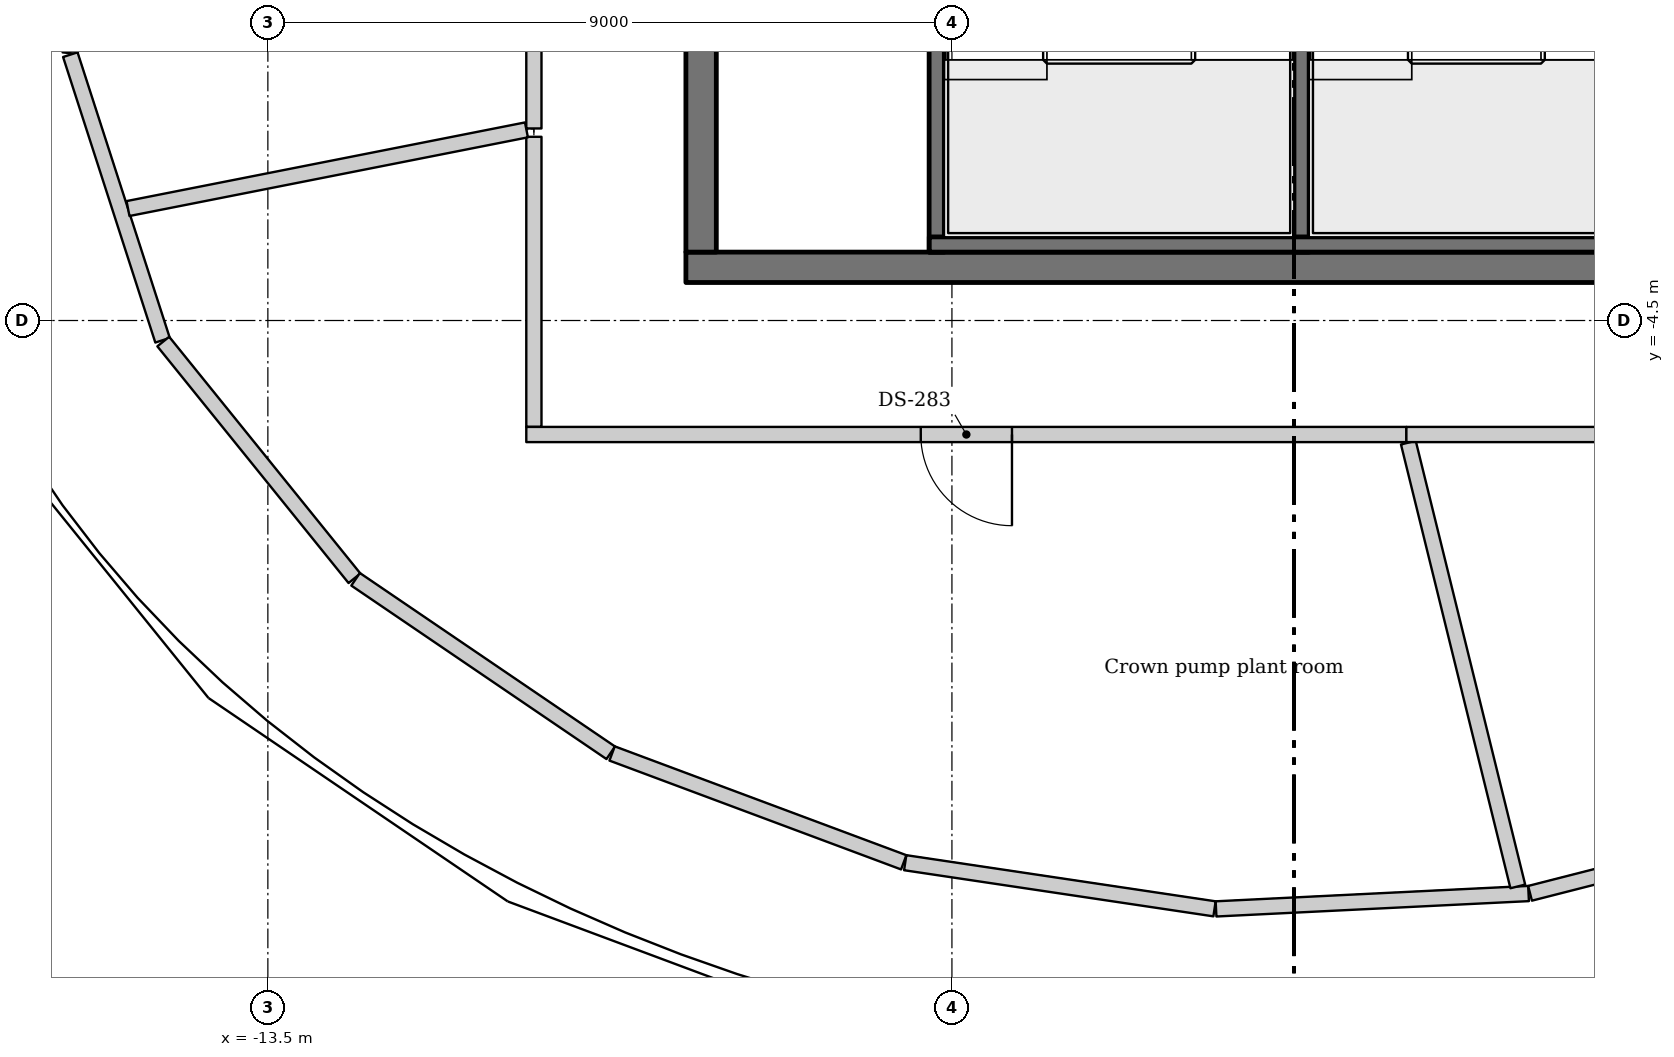
"""IFC4 building model, lengths in metres.
Left out: names, types, materials, properties, quantities, classifications, styles, units other than length and angle.
Written with IfcOpenShell. Run it as: python <this file> out.ifc"""

import sys

from ifc_helpers import new_model, si_unit, direction, frame, frame_2d, origin, place, context, subcontext, project, spatial, rectangle, extrude, source, transform, mapped, element, fill, save


model = new_model("IFC4")
c1 = context("Model", 3, precision=1e-05, world=origin(), true_north=direction((0.0, 1.0)))
c2 = subcontext(c1, "Body", "Model", "MODEL_VIEW")
j1 = project(units=[si_unit("LENGTHUNIT", "METRE"), si_unit("PLANEANGLEUNIT", "RADIAN")], contexts=[c1])
p1 = place(None, origin())
s1 = spatial("IfcSite", under=j1, at=p1, CompositionType="ELEMENT")
p2 = place(p1, origin())
s2 = spatial("IfcBuilding", under=s1, at=p2, CompositionType="ELEMENT")
p3 = place(p2, frame((0.0, 0.0, 356.5)))
s3 = spatial("IfcBuildingStorey", under=s2, at=p3, CompositionType="ELEMENT", Elevation=356.5)
m1 = source(origin(), c2, "Body", "SweptSolid", [
    extrude(rectangle(XDim=16.0, YDim=0.4, at=frame_2d((8.0, 0.0))), origin(), (0.0, 0.0, 1.0), 4.25),
])
p4 = place(p3, frame((-8.0, -3.8, 0.0), z_axis=(0.0, 0.0, 1.0), x_axis=(1.0, 0.0, 0.0)))
e1 = element("IfcWall", 1, at=p4, inside=s3, PredefinedType="SHEAR", context=c2, shape_type="MappedRepresentation", body=[
    mapped(m1, transform((0.0, 0.0, 0.0))),
])
m2 = source(origin(), c2, "Body", "SweptSolid", [
    extrude(rectangle(XDim=7.2, YDim=0.4, at=frame_2d((3.6, 0.0))), origin(), (0.0, 0.0, 1.0), 4.25),
])
p5 = place(p3, frame((-7.8, -3.6, 0.0), z_axis=(0.0, 0.0, 1.0), x_axis=(0.0, 1.0, 0.0)))
e2 = element("IfcWall", 2, at=p5, inside=s3, PredefinedType="SHEAR", context=c2, shape_type="MappedRepresentation", body=[
    mapped(m2, transform((0.0, 0.0, 0.0))),
])
m3 = source(origin(), c2, "Body", "SweptSolid", [
    extrude(rectangle(XDim=1.5, YDim=2.1, at=frame_2d((0.75, 1.05))), frame((0.0, 0.21, 0.0), z_axis=(0.0, -1.0, 0.0), x_axis=(1.0, 0.0, 0.0)), (0.0, 0.0, 1.0), 0.42),
])
p6 = place(p5, frame((4.8, 0.0, 0.0)))
e3 = element("IfcOpeningElement", 3, at=p6, cuts=e2, PredefinedType="OPENING", context=c2, shape_type="MappedRepresentation", body=[
    mapped(m3, transform((0.0, 0.0, 0.0))),
])
m4 = source(origin(), c2, "Body", "SweptSolid", [
    extrude(rectangle(XDim=3.933, YDim=0.2, at=frame_2d((1.966, 0.0))), origin(), (0.0, 0.0, 1.0), 4.25),
])
p7 = place(p3, frame((-16.101, -0.983, 0.0), z_axis=(0.0, 0.0, 1.0), x_axis=(0.10577691274, 0.994389885674, 0.0)))
e4 = element("IfcWall", 4, at=p7, inside=s3, PredefinedType="SOLIDWALL", context=c2, shape_type="MappedRepresentation", body=[
    mapped(m4, transform((0.0, 0.0, 0.0))),
])
m5 = source(origin(), c2, "Body", "SweptSolid", [
    extrude(rectangle(XDim=3.948, YDim=0.2, at=frame_2d((1.974, 0.0))), origin(), (0.0, 0.0, 1.0), 4.25),
])
p8 = place(p3, frame((-14.885, -4.76, 0.0), z_axis=(0.0, 0.0, 1.0), x_axis=(-0.307365880997, 0.951591411898, 0.0)))
e5 = element("IfcWall", 5, at=p8, inside=s3, PredefinedType="SOLIDWALL", context=c2, shape_type="MappedRepresentation", body=[
    mapped(m5, transform((0.0, 0.0, 0.0))),
])
m6 = source(origin(), c2, "Body", "SweptSolid", [
    extrude(rectangle(XDim=4.004, YDim=0.2, at=frame_2d((2.002, 0.0))), origin(), (0.0, 0.0, 1.0), 4.25),
])
p9 = place(p3, frame((-12.361, -7.892, 0.0), z_axis=(0.0, 0.0, 1.0), x_axis=(-0.628317235809, 0.777957229663, 0.0)))
e6 = element("IfcWall", 6, at=p9, inside=s3, PredefinedType="SOLIDWALL", context=c2, shape_type="MappedRepresentation", body=[
    mapped(m6, transform((0.0, 0.0, 0.0))),
])
m7 = source(origin(), c2, "Body", "SweptSolid", [
    extrude(rectangle(XDim=4.06, YDim=0.2, at=frame_2d((2.03, 0.0))), origin(), (0.0, 0.0, 1.0), 4.25),
])
p10 = place(p3, frame((-8.989, -10.188, 0.0), z_axis=(0.0, 0.0, 1.0), x_axis=(-0.826945516506, 0.562282057984, 0.0)))
e7 = element("IfcWall", 7, at=p10, inside=s3, PredefinedType="SOLIDWALL", context=c2, shape_type="MappedRepresentation", body=[
    mapped(m7, transform((0.0, 0.0, 0.0))),
])
m8 = source(origin(), c2, "Body", "SweptSolid", [
    extrude(rectangle(XDim=4.095, YDim=0.2, at=frame_2d((2.048, 0.0))), origin(), (0.0, 0.0, 1.0), 4.25),
])
p11 = place(p3, frame((-5.134, -11.629, 0.0), z_axis=(0.0, 0.0, 1.0), x_axis=(-0.936867035119, 0.349685799695, 0.0)))
e8 = element("IfcWall", 8, at=p11, inside=s3, PredefinedType="SOLIDWALL", context=c2, shape_type="MappedRepresentation", body=[
    mapped(m8, transform((0.0, 0.0, 0.0))),
])
m9 = source(origin(), c2, "Body", "SweptSolid", [
    extrude(rectangle(XDim=4.115, YDim=0.2, at=frame_2d((2.057, 0.0))), origin(), (0.0, 0.0, 1.0), 4.25),
])
p12 = place(p3, frame((-1.045, -12.241, 0.0), z_axis=(0.0, 0.0, 1.0), x_axis=(-0.989052252856, 0.147565717971, 0.0)))
e9 = element("IfcWall", 9, at=p12, inside=s3, PredefinedType="SOLIDWALL", context=c2, shape_type="MappedRepresentation", body=[
    mapped(m9, transform((0.0, 0.0, 0.0))),
])
m10 = source(origin(), c2, "Body", "SweptSolid", [
    extrude(rectangle(XDim=4.116, YDim=0.2, at=frame_2d((2.058, 0.0))), origin(), (0.0, 0.0, 1.0), 4.25),
])
p13 = place(p3, frame((3.086, -12.04, 0.0), z_axis=(0.0, 0.0, 1.0), x_axis=(-0.998790641863, -0.049165574616, 0.0)))
e10 = element("IfcWall", 10, at=p13, inside=s3, PredefinedType="SOLIDWALL", context=c2, shape_type="MappedRepresentation", body=[
    mapped(m10, transform((0.0, 0.0, 0.0))),
])
m11 = source(origin(), c2, "Body", "SweptSolid", [
    extrude(rectangle(XDim=4.107, YDim=0.2, at=frame_2d((2.054, 0.0))), origin(), (0.0, 0.0, 1.0), 4.25),
])
p14 = place(p3, frame((7.086, -11.021, 0.0), z_axis=(0.0, 0.0, 1.0), x_axis=(-0.96894922759, -0.247259770996, 0.0)))
e11 = element("IfcWall", 11, at=p14, inside=s3, PredefinedType="SOLIDWALL", context=c2, shape_type="MappedRepresentation", body=[
    mapped(m11, transform((0.0, 0.0, 0.0))),
])
m12 = source(origin(), c2, "Body", "SweptSolid", [
    extrude(rectangle(XDim=7.2, YDim=0.2, at=frame_2d((3.6, 0.0))), origin(), (0.0, 0.0, 1.0), 4.25),
])
p15 = place(p3, frame((0.1, 3.6, 0.0), z_axis=(0.0, 0.0, 1.0), x_axis=(0.0, -1.0, 0.0)))
e12 = element("IfcWall", 12, at=p15, inside=s3, PredefinedType="SHEAR", context=c2, shape_type="MappedRepresentation", body=[
    mapped(m12, transform((0.0, 0.0, 0.0))),
])
p16 = place(p3, frame((-4.7, 3.6, 0.0), z_axis=(0.0, 0.0, 1.0), x_axis=(0.0, -1.0, 0.0)))
e13 = element("IfcWall", 13, at=p16, inside=s3, PredefinedType="SHEAR", context=c2, shape_type="MappedRepresentation", body=[
    mapped(m12, transform((0.0, 0.0, 0.0))),
])
m13 = source(origin(), c2, "Body", "SweptSolid", [
    extrude(rectangle(XDim=1.2, YDim=2.1, at=frame_2d((0.6, 1.05))), frame((0.0, 0.11, 0.0), z_axis=(0.0, -1.0, 0.0), x_axis=(1.0, 0.0, 0.0)), (0.0, 0.0, 1.0), 0.22),
])
p17 = place(p16, frame((0.25, 0.0, 0.0)))
e14 = element("IfcOpeningElement", 14, at=p17, cuts=e13, PredefinedType="OPENING", context=c2, shape_type="MappedRepresentation", body=[
    mapped(m13, transform((0.0, 0.0, 0.0))),
])
m14 = source(origin(), c2, "Body", "SweptSolid", [
    extrude(rectangle(XDim=9.596, YDim=0.2, at=frame_2d((4.798, 0.0))), origin(), (0.0, 0.0, 1.0), 4.25),
])
p18 = place(p3, frame((-4.798, -3.5, 0.0), z_axis=(0.0, 0.0, 1.0), x_axis=(1.0, 0.0, 0.0)))
e15 = element("IfcWall", 15, at=p18, inside=s3, PredefinedType="SHEAR", context=c2, shape_type="MappedRepresentation", body=[
    mapped(m14, transform((0.0, 0.0, 0.0))),
])
m15 = source(origin(), c2, "Body", "SweptSolid", [
    extrude(rectangle(XDim=3.817, YDim=0.2, at=frame_2d((1.908, 0.0))), origin(), (0.0, 0.0, 1.0), 4.25),
])
p19 = place(p3, frame((-10.0, -5.9, 0.0), z_axis=(0.0, 0.0, 1.0), x_axis=(0.0, 1.0, 0.0)))
e16 = element("IfcWall", 16, at=p19, inside=s3, PredefinedType="PARTITIONING", context=c2, shape_type="MappedRepresentation", body=[
    mapped(m15, transform((0.0, 0.0, 0.0))),
])
m16 = source(origin(), c2, "Body", "SweptSolid", [
    extrude(rectangle(XDim=5.344, YDim=0.2, at=frame_2d((2.672, 0.0))), origin(), (0.0, 0.0, 1.0), 4.25),
])
p20 = place(p3, frame((-10.098, -1.992, 0.0), z_axis=(0.0, 0.0, 1.0), x_axis=(-0.981055750952, -0.193725614011, 0.0)))
e17 = element("IfcWall", 17, at=p20, inside=s3, PredefinedType="PARTITIONING", context=c2, shape_type="MappedRepresentation", body=[
    mapped(m16, transform((0.0, 0.0, 0.0))),
])
m17 = source(origin(), c2, "Body", "SweptSolid", [
    extrude(rectangle(XDim=7.873, YDim=0.2, at=frame_2d((3.937, 0.0))), origin(), (0.0, 0.0, 1.0), 4.25),
])
p21 = place(p3, frame((-10.0, -1.973, 0.0), z_axis=(0.0, 0.0, 1.0), x_axis=(0.0, 1.0, 0.0)))
e18 = element("IfcWall", 18, at=p21, inside=s3, PredefinedType="PARTITIONING", context=c2, shape_type="MappedRepresentation", body=[
    mapped(m17, transform((0.0, 0.0, 0.0))),
])
m18 = source(origin(), c2, "Body", "SweptSolid", [
    extrude(rectangle(XDim=11.579, YDim=0.2, at=frame_2d((5.79, 0.0))), origin(), (0.0, 0.0, 1.0), 4.25),
])
p22 = place(p3, frame((1.479, -6.0, 0.0), z_axis=(0.0, 0.0, 1.0), x_axis=(-1.0, 0.0, 0.0)))
e19 = element("IfcWall", 19, at=p22, inside=s3, PredefinedType="PARTITIONING", context=c2, shape_type="MappedRepresentation", body=[
    mapped(m18, transform((0.0, 0.0, 0.0))),
])
p23 = place(p22, frame((5.189, 0.0, 0.0)))
e20 = element("IfcOpeningElement", 20, at=p23, cuts=e19, PredefinedType="OPENING", context=c2, shape_type="MappedRepresentation", body=[
    mapped(m13, transform((0.0, 0.0, 0.0))),
])
m19 = source(origin(), c2, "Body", "SweptSolid", [
    extrude(rectangle(XDim=6.014, YDim=0.2, at=frame_2d((3.007, 0.0))), origin(), (0.0, 0.0, 1.0), 4.25),
])
p24 = place(p3, frame((1.505, -6.107, 0.0), z_axis=(0.0, 0.0, 1.0), x_axis=(0.239468317603, -0.970904179033, 0.0)))
e21 = element("IfcWall", 21, at=p24, inside=s3, PredefinedType="PARTITIONING", context=c2, shape_type="MappedRepresentation", body=[
    mapped(m19, transform((0.0, 0.0, 0.0))),
])
m20 = source(origin(), c2, "Body", "SweptSolid", [
    extrude(rectangle(XDim=8.621, YDim=0.2, at=frame_2d((4.311, 0.0))), origin(), (0.0, 0.0, 1.0), 4.25),
])
p25 = place(p3, frame((10.1, -6.0, 0.0), z_axis=(0.0, 0.0, 1.0), x_axis=(-1.0, 0.0, 0.0)))
e22 = element("IfcWall", 22, at=p25, inside=s3, PredefinedType="PARTITIONING", context=c2, shape_type="MappedRepresentation", body=[
    mapped(m20, transform((0.0, 0.0, 0.0))),
])
p26 = place(p25, frame((3.711, 0.0, 0.0)))
e23 = element("IfcOpeningElement", 23, at=p26, cuts=e22, PredefinedType="OPENING", context=c2, shape_type="MappedRepresentation", body=[
    mapped(m13, transform((0.0, 0.0, 0.0))),
])
m21 = source(origin(), c2, "Body", "SweptSolid", [
    extrude(rectangle(XDim=1.2, YDim=2.1, at=frame_2d((0.6, 1.05))), frame((0.0, 0.025, 0.0), z_axis=(0.0, -1.0, 0.0), x_axis=(1.0, 0.0, 0.0)), (0.0, 0.0, 1.0), 0.05),
])
p27 = place(p23, origin())
e24 = element("IfcDoor", 24, at=p27, inside=s3, OperationType="SINGLE_SWING_LEFT", PredefinedType="DOOR", context=c2, shape_type="MappedRepresentation", body=[
    mapped(m21, transform((0.0, 0.0, 0.0))),
])
fill(e20, e24)
save(model, sys.argv[1])
